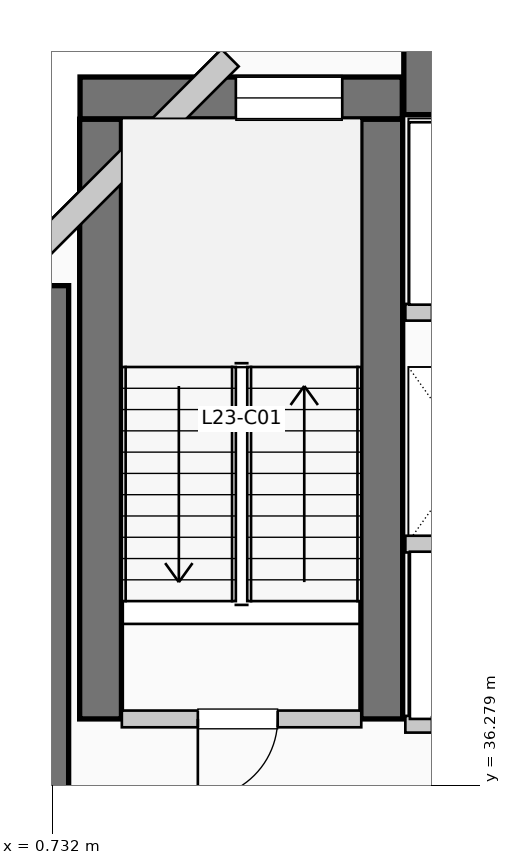
"""IFC4 building model, lengths in metres.
Left out: names, types, materials, properties, quantities, classifications, styles, units other than length and angle.
Written with IfcOpenShell. Run it as: python <this file> out.ifc"""

import sys

from ifc_helpers import new_model, si_unit, direction, frame, frame_2d, origin, place, context, subcontext, project, spatial, rectangle, extrude, element, fill, save


model = new_model("IFC4")
c1 = context("Model", 3, precision=1e-05, world=origin(), true_north=direction((0.0, 1.0)))
c2 = subcontext(c1, "Body", "Model", "MODEL_VIEW")
j1 = project(units=[si_unit("LENGTHUNIT", "METRE"), si_unit("PLANEANGLEUNIT", "RADIAN")], contexts=[c1])
p1 = place(None, origin())
s1 = spatial("IfcSite", under=j1, at=p1, CompositionType="ELEMENT")
p2 = place(p1, origin())
s2 = spatial("IfcBuilding", under=s1, at=p2, CompositionType="ELEMENT")
p3 = place(p2, frame((0.0, 0.0, 98.67)))
s3 = spatial("IfcBuildingStorey", under=s2, at=p3, CompositionType="ELEMENT", Elevation=98.67)
p4 = place(p3, frame((5.36, 45.55, 0.0), z_axis=(0.0, 0.0, 1.0), x_axis=(1.0, 0.0, 0.0)))
e1 = element("IfcWall", 1, at=p4, inside=s3, PredefinedType="SHEAR", context=c2, shape_type="SweptSolid", body=[
    extrude(rectangle(XDim=13.98, YDim=0.9, at=frame_2d((6.99, 0.0))), origin(), (0.0, 0.0, 1.0), 3.96),
])
p5 = place(p3, frame((0.5, 34.95, 0.0), z_axis=(0.0, 0.0, 1.0), x_axis=(0.0, 1.0, 0.0)))
e2 = element("IfcWall", 2, at=p5, inside=s3, PredefinedType="SHEAR", context=c2, shape_type="SweptSolid", body=[
    extrude(rectangle(XDim=7.9, YDim=0.9, at=frame_2d((3.95, 0.0))), origin(), (0.0, 0.0, 1.0), 3.96),
])
for number, where, z_axis, x_axis in (
    (3, (1.37, 37.15, 0.0), (0.0, 0.0, 1.0), (0.0, 1.0, 0.0)),
    (4, (5.07, 37.15, 0.0), (0.0, 0.0, 1.0), (0.0, 1.0, 0.0)),
):
    element("IfcWall", number, at=place(p3, frame(where, z_axis=z_axis, x_axis=x_axis)), inside=s3, PredefinedType="SHEAR", context=c2, shape_type="SweptSolid", body=[
        extrude(rectangle(XDim=7.89, YDim=0.55, at=frame_2d((3.945, 0.0))), origin(), (0.0, 0.0, 1.0), 3.96),
    ])
p6 = place(p3, frame((1.1, 45.32, 0.0), z_axis=(0.0, 0.0, 1.0), x_axis=(1.0, 0.0, 0.0)))
e5 = element("IfcWall", 5, at=p6, inside=s3, PredefinedType="SHEAR", context=c2, shape_type="SweptSolid", body=[
    extrude(rectangle(XDim=4.24, YDim=0.55, at=frame_2d((2.12, 0.0))), origin(), (0.0, 0.0, 1.0), 3.96),
])
p7 = place(p6, frame((2.05, 0.0, 1.05)))
e6 = element("IfcOpeningElement", 6, at=p7, cuts=e5, PredefinedType="OPENING", context=c2, shape_type="SweptSolid", body=[
    extrude(rectangle(XDim=1.4, YDim=1.8, at=frame_2d((0.7, 0.9))), frame((0.0, 0.285, 0.0), z_axis=(0.0, -1.0, 0.0), x_axis=(1.0, 0.0, 0.0)), (0.0, 0.0, 1.0), 0.57),
])
p8 = place(p3, frame((3.074, 45.848, 0.0), z_axis=(0.0, 0.0, 1.0), x_axis=(-0.707106781187, -0.707106781187, 0.0)))
e7 = element("IfcWall", 7, at=p8, inside=s3, PredefinedType="SOLIDWALL", context=c2, shape_type="SweptSolid", body=[
    extrude(rectangle(XDim=4.133, YDim=0.32, at=frame_2d((2.066, 0.0))), origin(), (0.0, 0.0, 1.0), 3.71),
])
p9 = place(p3, frame((1.65, 37.15, 0.0), z_axis=(0.0, 0.0, 1.0), x_axis=(1.0, 0.0, 0.0)))
e8 = element("IfcWall", 8, at=p9, inside=s3, PredefinedType="PARTITIONING", context=c2, shape_type="SweptSolid", body=[
    extrude(rectangle(XDim=3.15, YDim=0.22, at=frame_2d((1.575, 0.0))), origin(), (0.0, 0.0, 1.0), 3.71),
])
p10 = place(p9, frame((2.05, 0.0, 0.0), z_axis=(0.0, 0.0, 1.0), x_axis=(-1.0, 0.0, 0.0)))
e9 = element("IfcOpeningElement", 9, at=p10, cuts=e8, PredefinedType="OPENING", context=c2, shape_type="SweptSolid", body=[
    extrude(rectangle(XDim=1.05, YDim=2.15, at=frame_2d((0.525, 1.075))), frame((0.0, 0.12, 0.0), z_axis=(0.0, -1.0, 0.0), x_axis=(1.0, 0.0, 0.0)), (0.0, 0.0, 1.0), 0.24),
])
p11 = place(p3, frame((5.38, 37.08, 0.0), z_axis=(0.0, 0.0, 1.0), x_axis=(1.0, 0.0, 0.0)))
e10 = element("IfcWall", 10, at=p11, inside=s3, PredefinedType="PARTITIONING", context=c2, shape_type="SweptSolid", body=[
    extrude(rectangle(XDim=3.46, YDim=0.22, at=frame_2d((1.73, 0.0))), origin(), (0.0, 0.0, 1.0), 3.71),
])
p12 = place(p11, frame((1.55, 0.0, 0.0), z_axis=(0.0, 0.0, 1.0), x_axis=(-1.0, 0.0, 0.0)))
e11 = element("IfcOpeningElement", 11, at=p12, cuts=e10, PredefinedType="OPENING", context=c2, shape_type="SweptSolid", body=[
    extrude(rectangle(XDim=1.2, YDim=2.2, at=frame_2d((0.6, 1.1))), frame((0.0, 0.12, 0.0), z_axis=(0.0, -1.0, 0.0), x_axis=(1.0, 0.0, 0.0)), (0.0, 0.0, 1.0), 0.24),
])
p13 = place(p11, frame((3.22, 0.0, 0.0), z_axis=(0.0, 0.0, 1.0), x_axis=(-1.0, 0.0, 0.0)))
e12 = element("IfcOpeningElement", 12, at=p13, cuts=e10, PredefinedType="OPENING", context=c2, shape_type="SweptSolid", body=[
    extrude(rectangle(XDim=1.2, YDim=2.2, at=frame_2d((0.6, 1.1))), frame((0.0, 0.12, 0.0), z_axis=(0.0, -1.0, 0.0), x_axis=(1.0, 0.0, 0.0)), (0.0, 0.0, 1.0), 0.24),
])
p14 = place(p3, frame((5.38, 39.45, 0.0), z_axis=(0.0, 0.0, 1.0), x_axis=(1.0, 0.0, 0.0)))
e13 = element("IfcWall", 13, at=p14, inside=s3, PredefinedType="PARTITIONING", context=c2, shape_type="SweptSolid", body=[
    extrude(rectangle(XDim=3.46, YDim=0.22, at=frame_2d((1.73, 0.0))), origin(), (0.0, 0.0, 1.0), 3.71),
])
p15 = place(p3, frame((5.38, 42.5, 0.0), z_axis=(0.0, 0.0, 1.0), x_axis=(1.0, 0.0, 0.0)))
e14 = element("IfcWall", 14, at=p15, inside=s3, PredefinedType="PARTITIONING", context=c2, shape_type="SweptSolid", body=[
    extrude(rectangle(XDim=3.77, YDim=0.22, at=frame_2d((1.885, 0.0))), origin(), (0.0, 0.0, 1.0), 3.71),
])
p16 = place(p15, frame((1.75, 0.0, 0.0), z_axis=(0.0, 0.0, 1.0), x_axis=(-1.0, 0.0, 0.0)))
e15 = element("IfcOpeningElement", 15, at=p16, cuts=e14, PredefinedType="OPENING", context=c2, shape_type="SweptSolid", body=[
    extrude(rectangle(XDim=1.4, YDim=2.2, at=frame_2d((0.7, 1.1))), frame((0.0, 0.12, 0.0), z_axis=(0.0, -1.0, 0.0), x_axis=(1.0, 0.0, 0.0)), (0.0, 0.0, 1.0), 0.24),
])
p17 = place(p15, frame((3.53, 0.0, 0.0), z_axis=(0.0, 0.0, 1.0), x_axis=(-1.0, 0.0, 0.0)))
e16 = element("IfcOpeningElement", 16, at=p17, cuts=e14, PredefinedType="OPENING", context=c2, shape_type="SweptSolid", body=[
    extrude(rectangle(XDim=1.4, YDim=2.2, at=frame_2d((0.7, 1.1))), frame((0.0, 0.12, 0.0), z_axis=(0.0, -1.0, 0.0), x_axis=(1.0, 0.0, 0.0)), (0.0, 0.0, 1.0), 0.24),
])
p18 = place(p7, origin())
e17 = element("IfcWindow", 17, at=p18, inside=s3, PartitioningType="SINGLE_PANEL", PredefinedType="WINDOW", context=c2, shape_type="SweptSolid", body=[
    extrude(rectangle(XDim=1.4, YDim=1.8, at=frame_2d((0.7, 0.9))), frame((0.0, 0.03, 0.0), z_axis=(0.0, -1.0, 0.0), x_axis=(1.0, 0.0, 0.0)), (0.0, 0.0, 1.0), 0.06),
])
fill(e6, e17)
p19 = place(p10, origin())
e18 = element("IfcDoor", 18, at=p19, inside=s3, OperationType="SINGLE_SWING_LEFT", PredefinedType="DOOR", context=c2, shape_type="SweptSolid", body=[
    extrude(rectangle(XDim=1.05, YDim=2.15, at=frame_2d((0.525, 1.075))), frame((0.0, 0.025, 0.0), z_axis=(0.0, -1.0, 0.0), x_axis=(1.0, 0.0, 0.0)), (0.0, 0.0, 1.0), 0.05),
])
fill(e9, e18)
save(model, sys.argv[1])
